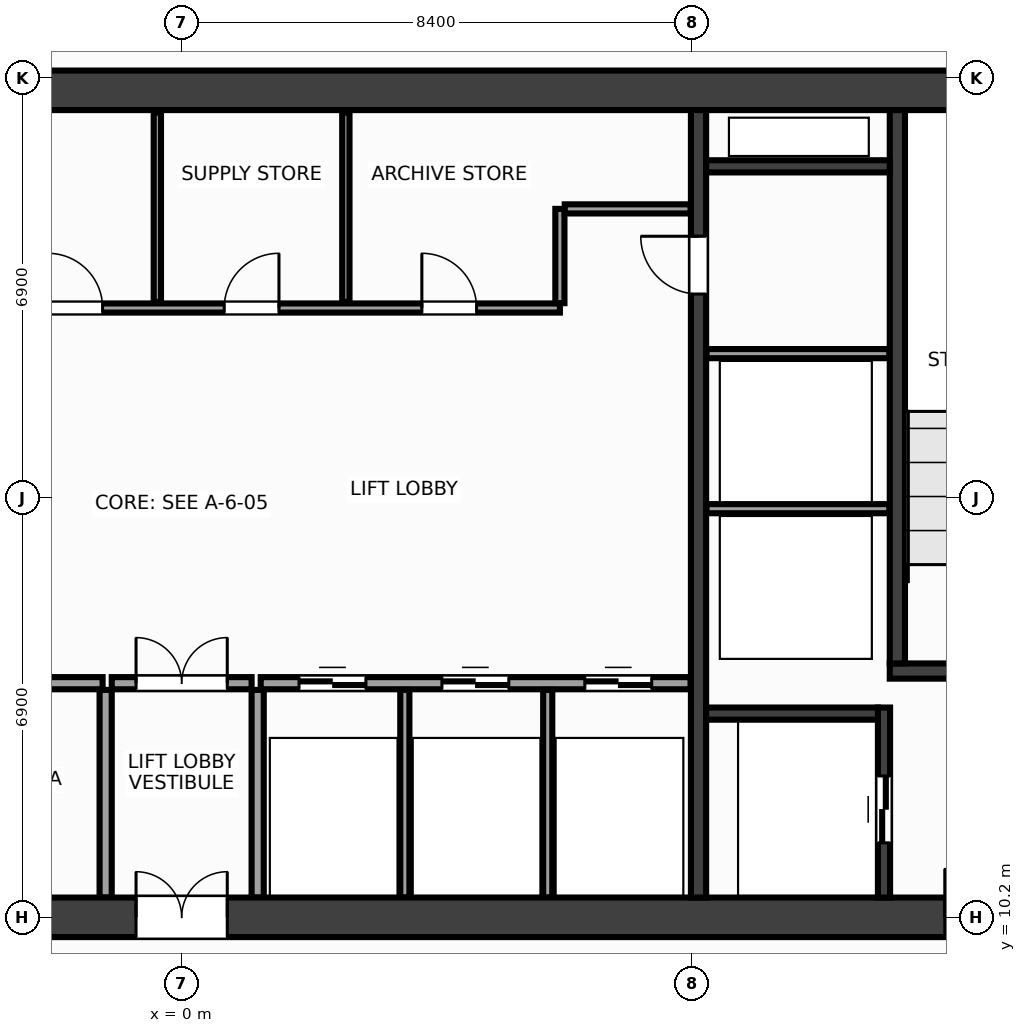
"""IFC4 building model, lengths in metres.
Left out: names, types, materials, properties, quantities, classifications, styles, units other than length and angle.
Written with IfcOpenShell. Run it as: python <this file> out.ifc"""

import sys

from ifc_helpers import new_model, si_unit, direction, frame, frame_2d, origin, place, context, subcontext, project, spatial, rectangle, extrude, source, transform, mapped, element, fill, save


model = new_model("IFC4")
c1 = context("Model", 3, precision=1e-05, world=origin(), true_north=direction((0.0, 1.0)))
c2 = subcontext(c1, "Body", "Model", "MODEL_VIEW")
j1 = project(units=[si_unit("LENGTHUNIT", "METRE"), si_unit("PLANEANGLEUNIT", "RADIAN")], contexts=[c1])
p1 = place(None, origin())
s1 = spatial("IfcSite", under=j1, at=p1, CompositionType="ELEMENT")
p2 = place(p1, origin())
s2 = spatial("IfcBuilding", under=s1, at=p2, CompositionType="ELEMENT")
p3 = place(p2, frame((0.0, 0.0, 178.4)))
s3 = spatial("IfcBuildingStorey", under=s2, at=p3, CompositionType="ELEMENT", Elevation=178.4)
m1 = source(origin(), c2, "Body", "SweptSolid", [
    extrude(rectangle(XDim=31.85, YDim=0.65, at=frame_2d((15.925, 0.0))), origin(), (0.0, 0.0, 1.0), 3.6),
])
p4 = place(p3, frame((-15.925, 23.8, 0.0), z_axis=(0.0, 0.0, 1.0), x_axis=(1.0, 0.0, 0.0)))
e1 = element("IfcWall", 1, at=p4, inside=s3, PredefinedType="SHEAR", context=c2, shape_type="MappedRepresentation", body=[
    mapped(m1, transform((0.0, 0.0, 0.0), x_axis=(1.0, 0.0, 0.0), y_axis=(0.0, 1.0, 0.0), z_axis=(0.0, 0.0, 1.0), scale=1.0)),
])
p5 = place(p3, frame((-15.925, 10.2, 0.0), z_axis=(0.0, 0.0, 1.0), x_axis=(1.0, 0.0, 0.0)))
e2 = element("IfcWall", 2, at=p5, inside=s3, PredefinedType="SHEAR", context=c2, shape_type="MappedRepresentation", body=[
    mapped(m1, transform((0.0, 0.0, 0.0), x_axis=(1.0, 0.0, 0.0), y_axis=(0.0, 1.0, 0.0), z_axis=(0.0, 0.0, 1.0), scale=1.0)),
])
p6 = place(p5, frame((1.775, 0.0, 0.0)))
e3 = element("IfcOpeningElement", 3, at=p6, cuts=e2, PredefinedType="OPENING", context=c2, shape_type="SweptSolid", body=[
    extrude(rectangle(XDim=1.6, YDim=2.15, at=frame_2d((0.8, 1.075))), frame((0.0, 0.337, 0.0), z_axis=(0.0, -1.0, 0.0), x_axis=(1.0, 0.0, 0.0)), (0.0, 0.0, 1.0), 0.674),
])
p7 = place(p5, frame((28.475, 0.0, 0.0)))
e4 = element("IfcOpeningElement", 4, at=p7, cuts=e2, PredefinedType="OPENING", context=c2, shape_type="SweptSolid", body=[
    extrude(rectangle(XDim=1.6, YDim=2.15, at=frame_2d((0.8, 1.075))), frame((0.0, 0.337, 0.0), z_axis=(0.0, -1.0, 0.0), x_axis=(1.0, 0.0, 0.0)), (0.0, 0.0, 1.0), 0.674),
])
p8 = place(p5, frame((15.175, 0.0, 0.0)))
e5 = element("IfcOpeningElement", 5, at=p8, cuts=e2, PredefinedType="OPENING", context=c2, shape_type="SweptSolid", body=[
    extrude(rectangle(XDim=1.5, YDim=2.2, at=frame_2d((0.75, 1.1))), frame((0.0, 0.337, 0.0), z_axis=(0.0, -1.0, 0.0), x_axis=(1.0, 0.0, 0.0)), (0.0, 0.0, 1.0), 0.674),
])
m2 = source(origin(), c2, "Body", "SweptSolid", [
    extrude(rectangle(XDim=12.95, YDim=0.25, at=frame_2d((6.475, 0.0))), origin(), (0.0, 0.0, 1.0), 3.6),
])
p9 = place(p3, frame((8.5, 10.525, 0.0), z_axis=(0.0, 0.0, 1.0), x_axis=(0.0, 1.0, 0.0)))
e6 = element("IfcWall", 6, at=p9, inside=s3, PredefinedType="SHEAR", context=c2, shape_type="MappedRepresentation", body=[
    mapped(m2, transform((0.0, 0.0, 0.0), x_axis=(1.0, 0.0, 0.0), y_axis=(0.0, 1.0, 0.0), z_axis=(0.0, 0.0, 1.0), scale=1.0)),
])
p10 = place(p9, frame((9.925, 0.0, 0.0)))
e7 = element("IfcOpeningElement", 7, at=p10, cuts=e6, PredefinedType="OPENING", context=c2, shape_type="SweptSolid", body=[
    extrude(rectangle(XDim=0.95, YDim=2.15, at=frame_2d((0.475, 1.075))), frame((0.0, 0.137, 0.0), z_axis=(0.0, -1.0, 0.0), x_axis=(1.0, 0.0, 0.0)), (0.0, 0.0, 1.0), 0.274),
])
m3 = source(origin(), c2, "Body", "SweptSolid", [
    extrude(rectangle(XDim=3.63, YDim=0.25, at=frame_2d((1.815, 0.0))), origin(), (0.0, 0.0, 1.0), 3.6),
])
p11 = place(p3, frame((11.645, 14.25, 0.0), z_axis=(0.0, 0.0, 1.0), x_axis=(1.0, 0.0, 0.0)))
e8 = element("IfcWall", 8, at=p11, inside=s3, PredefinedType="SHEAR", context=c2, shape_type="MappedRepresentation", body=[
    mapped(m3, transform((0.0, 0.0, 0.0), x_axis=(1.0, 0.0, 0.0), y_axis=(0.0, 1.0, 0.0), z_axis=(0.0, 0.0, 1.0), scale=1.0)),
])
p12 = place(p11, frame((0.95, 0.0, 0.0)))
e9 = element("IfcOpeningElement", 9, at=p12, cuts=e8, PredefinedType="OPENING", context=c2, shape_type="SweptSolid", body=[
    extrude(rectangle(XDim=1.6, YDim=2.15, at=frame_2d((0.8, 1.075))), frame((0.0, 0.137, 0.0), z_axis=(0.0, -1.0, 0.0), x_axis=(1.0, 0.0, 0.0)), (0.0, 0.0, 1.0), 0.274),
])
m4 = source(origin(), c2, "Body", "SweptSolid", [
    extrude(rectangle(XDim=9.1, YDim=0.25, at=frame_2d((4.55, 0.0))), origin(), (0.0, 0.0, 1.0), 3.6),
])
p13 = place(p3, frame((11.77, 14.375, 0.0), z_axis=(0.0, 0.0, 1.0), x_axis=(0.0, 1.0, 0.0)))
e10 = element("IfcWall", 10, at=p13, inside=s3, PredefinedType="SHEAR", context=c2, shape_type="MappedRepresentation", body=[
    mapped(m4, transform((0.0, 0.0, 0.0), x_axis=(1.0, 0.0, 0.0), y_axis=(0.0, 1.0, 0.0), z_axis=(0.0, 0.0, 1.0), scale=1.0)),
])
m5 = source(origin(), c2, "Body", "SweptSolid", [
    extrude(rectangle(XDim=3.125, YDim=0.2, at=frame_2d((1.562, 0.0))), origin(), (0.0, 0.0, 1.0), 3.6),
])
p14 = place(p3, frame((11.55, 10.525, 0.0), z_axis=(0.0, 0.0, 1.0), x_axis=(0.0, 1.0, 0.0)))
e11 = element("IfcWall", 11, at=p14, inside=s3, PredefinedType="SHEAR", context=c2, shape_type="MappedRepresentation", body=[
    mapped(m5, transform((0.0, 0.0, 0.0), x_axis=(1.0, 0.0, 0.0), y_axis=(0.0, 1.0, 0.0), z_axis=(0.0, 0.0, 1.0), scale=1.0)),
])
p15 = place(p14, frame((0.9, 0.0, 0.0)))
e12 = element("IfcOpeningElement", 12, at=p15, cuts=e11, PredefinedType="OPENING", context=c2, shape_type="SweptSolid", body=[
    extrude(rectangle(XDim=1.1, YDim=2.15, at=frame_2d((0.55, 1.075))), frame((0.0, 0.112, 0.0), z_axis=(0.0, -1.0, 0.0), x_axis=(1.0, 0.0, 0.0)), (0.0, 0.0, 1.0), 0.224),
])
m6 = source(origin(), c2, "Body", "SweptSolid", [
    extrude(rectangle(XDim=2.825, YDim=0.2, at=frame_2d((1.413, 0.0))), origin(), (0.0, 0.0, 1.0), 3.6),
])
p16 = place(p3, frame((8.625, 13.55, 0.0), z_axis=(0.0, 0.0, 1.0), x_axis=(1.0, 0.0, 0.0)))
e13 = element("IfcWall", 13, at=p16, inside=s3, PredefinedType="SHEAR", context=c2, shape_type="MappedRepresentation", body=[
    mapped(m6, transform((0.0, 0.0, 0.0), x_axis=(1.0, 0.0, 0.0), y_axis=(0.0, 1.0, 0.0), z_axis=(0.0, 0.0, 1.0), scale=1.0)),
])
m7 = source(origin(), c2, "Body", "SweptSolid", [
    extrude(rectangle(XDim=3.02, YDim=0.2, at=frame_2d((1.51, 0.0))), origin(), (0.0, 0.0, 1.0), 3.6),
])
p17 = place(p3, frame((8.625, 22.55, 0.0), z_axis=(0.0, 0.0, 1.0), x_axis=(1.0, 0.0, 0.0)))
e14 = element("IfcWall", 14, at=p17, inside=s3, PredefinedType="SHEAR", context=c2, shape_type="MappedRepresentation", body=[
    mapped(m7, transform((0.0, 0.0, 0.0), x_axis=(1.0, 0.0, 0.0), y_axis=(0.0, 1.0, 0.0), z_axis=(0.0, 0.0, 1.0), scale=1.0)),
])
m8 = source(origin(), c2, "Body", "SweptSolid", [
    extrude(rectangle(XDim=3.01, YDim=0.15, at=frame_2d((1.505, 0.0))), origin(), (0.0, 0.0, 1.0), 3.38),
])
for number, where, z_axis, x_axis in (
    (15, (8.63, 16.92, 0.0), (0.0, 0.0, 1.0), (1.0, 0.0, 0.0)),
    (16, (8.63, 19.47, 0.0), (0.0, 0.0, 1.0), (1.0, 0.0, 0.0)),
):
    element("IfcWall", number, at=place(p3, frame(where, z_axis=z_axis, x_axis=x_axis)), inside=s3, PredefinedType="PARTITIONING", context=c2, shape_type="MappedRepresentation", body=[
        mapped(m8, transform((0.0, 0.0, 0.0), x_axis=(1.0, 0.0, 0.0), y_axis=(0.0, 1.0, 0.0), z_axis=(0.0, 0.0, 1.0), scale=1.0)),
    ])
m9 = source(origin(), c2, "Body", "SweptSolid", [
    extrude(rectangle(XDim=7.07, YDim=0.2, at=frame_2d((3.535, 0.0))), origin(), (0.0, 0.0, 1.0), 3.38),
])
p18 = place(p3, frame((-8.37, 14.05, 0.0), z_axis=(0.0, 0.0, 1.0), x_axis=(1.0, 0.0, 0.0)))
e17 = element("IfcWall", 17, at=p18, inside=s3, PredefinedType="PARTITIONING", context=c2, shape_type="MappedRepresentation", body=[
    mapped(m9, transform((0.0, 0.0, 0.0), x_axis=(1.0, 0.0, 0.0), y_axis=(0.0, 1.0, 0.0), z_axis=(0.0, 0.0, 1.0), scale=1.0)),
])
p19 = place(p18, frame((1.06, 0.0, 0.0)))
e18 = element("IfcOpeningElement", 18, at=p19, cuts=e17, PredefinedType="OPENING", context=c2, shape_type="SweptSolid", body=[
    extrude(rectangle(XDim=0.9, YDim=2.15, at=frame_2d((0.45, 1.075))), frame((0.0, 0.112, 0.0), z_axis=(0.0, -1.0, 0.0), x_axis=(1.0, 0.0, 0.0)), (0.0, 0.0, 1.0), 0.224),
])
p20 = place(p18, frame((4.51, 0.0, 0.0)))
e19 = element("IfcOpeningElement", 19, at=p20, cuts=e17, PredefinedType="OPENING", context=c2, shape_type="SweptSolid", body=[
    extrude(rectangle(XDim=0.9, YDim=2.15, at=frame_2d((0.45, 1.075))), frame((0.0, 0.112, 0.0), z_axis=(0.0, -1.0, 0.0), x_axis=(1.0, 0.0, 0.0)), (0.0, 0.0, 1.0), 0.224),
])
p21 = place(p3, frame((1.3, 14.05, 0.0), z_axis=(0.0, 0.0, 1.0), x_axis=(1.0, 0.0, 0.0)))
e20 = element("IfcWall", 20, at=p21, inside=s3, PredefinedType="PARTITIONING", context=c2, shape_type="MappedRepresentation", body=[
    mapped(m9, transform((0.0, 0.0, 0.0), x_axis=(1.0, 0.0, 0.0), y_axis=(0.0, 1.0, 0.0), z_axis=(0.0, 0.0, 1.0), scale=1.0)),
])
p22 = place(p21, frame((0.63, 0.0, 0.0)))
e21 = element("IfcOpeningElement", 21, at=p22, cuts=e20, PredefinedType="OPENING", context=c2, shape_type="SweptSolid", body=[
    extrude(rectangle(XDim=1.1, YDim=2.15, at=frame_2d((0.55, 1.075))), frame((0.0, 0.112, 0.0), z_axis=(0.0, -1.0, 0.0), x_axis=(1.0, 0.0, 0.0)), (0.0, 0.0, 1.0), 0.224),
])
p23 = place(p21, frame((2.98, 0.0, 0.0)))
e22 = element("IfcOpeningElement", 22, at=p23, cuts=e20, PredefinedType="OPENING", context=c2, shape_type="SweptSolid", body=[
    extrude(rectangle(XDim=1.1, YDim=2.15, at=frame_2d((0.55, 1.075))), frame((0.0, 0.112, 0.0), z_axis=(0.0, -1.0, 0.0), x_axis=(1.0, 0.0, 0.0)), (0.0, 0.0, 1.0), 0.224),
])
p24 = place(p21, frame((5.33, 0.0, 0.0)))
e23 = element("IfcOpeningElement", 23, at=p24, cuts=e20, PredefinedType="OPENING", context=c2, shape_type="SweptSolid", body=[
    extrude(rectangle(XDim=1.1, YDim=2.15, at=frame_2d((0.55, 1.075))), frame((0.0, 0.112, 0.0), z_axis=(0.0, -1.0, 0.0), x_axis=(1.0, 0.0, 0.0)), (0.0, 0.0, 1.0), 0.224),
])
m10 = source(origin(), c2, "Body", "SweptSolid", [
    extrude(rectangle(XDim=3.415, YDim=0.2, at=frame_2d((1.708, 0.0))), origin(), (0.0, 0.0, 1.0), 3.38),
])
for number, where, z_axis, x_axis in (
    (24, (-1.25, 10.525, 0.0), (0.0, 0.0, 1.0), (0.0, 1.0, 0.0)),
    (25, (1.25, 10.525, 0.0), (0.0, 0.0, 1.0), (0.0, 1.0, 0.0)),
):
    element("IfcWall", number, at=place(p3, frame(where, z_axis=z_axis, x_axis=x_axis)), inside=s3, PredefinedType="PARTITIONING", context=c2, shape_type="MappedRepresentation", body=[
        mapped(m10, transform((0.0, 0.0, 0.0), x_axis=(1.0, 0.0, 0.0), y_axis=(0.0, 1.0, 0.0), z_axis=(0.0, 0.0, 1.0), scale=1.0)),
    ])
m11 = source(origin(), c2, "Body", "SweptSolid", [
    extrude(rectangle(XDim=2.3, YDim=0.2, at=frame_2d((1.15, 0.0))), origin(), (0.0, 0.0, 1.0), 3.38),
])
p25 = place(p3, frame((-1.15, 14.05, 0.0), z_axis=(0.0, 0.0, 1.0), x_axis=(1.0, 0.0, 0.0)))
e26 = element("IfcWall", 26, at=p25, inside=s3, PredefinedType="PARTITIONING", context=c2, shape_type="MappedRepresentation", body=[
    mapped(m11, transform((0.0, 0.0, 0.0), x_axis=(1.0, 0.0, 0.0), y_axis=(0.0, 1.0, 0.0), z_axis=(0.0, 0.0, 1.0), scale=1.0)),
])
p26 = place(p25, frame((0.4, 0.0, 0.0)))
e27 = element("IfcOpeningElement", 27, at=p26, cuts=e26, PredefinedType="OPENING", context=c2, shape_type="SweptSolid", body=[
    extrude(rectangle(XDim=1.5, YDim=2.2, at=frame_2d((0.75, 1.1))), frame((0.0, 0.112, 0.0), z_axis=(0.0, -1.0, 0.0), x_axis=(1.0, 0.0, 0.0)), (0.0, 0.0, 1.0), 0.224),
])
m12 = source(origin(), c2, "Body", "SweptSolid", [
    extrude(rectangle(XDim=14.59, YDim=0.15, at=frame_2d((7.295, 0.0))), origin(), (0.0, 0.0, 1.0), 3.38),
])
p27 = place(p3, frame((-8.37, 20.22, 0.0), z_axis=(0.0, 0.0, 1.0), x_axis=(1.0, 0.0, 0.0)))
e28 = element("IfcWall", 28, at=p27, inside=s3, PredefinedType="PARTITIONING", context=c2, shape_type="MappedRepresentation", body=[
    mapped(m12, transform((0.0, 0.0, 0.0), x_axis=(1.0, 0.0, 0.0), y_axis=(0.0, 1.0, 0.0), z_axis=(0.0, 0.0, 1.0), scale=1.0)),
])
p28 = place(p27, frame((0.86, 0.0, 0.0)))
e29 = element("IfcOpeningElement", 29, at=p28, cuts=e28, PredefinedType="OPENING", context=c2, shape_type="SweptSolid", body=[
    extrude(rectangle(XDim=0.9, YDim=2.15, at=frame_2d((0.45, 1.075))), frame((0.0, 0.087, 0.0), z_axis=(0.0, -1.0, 0.0), x_axis=(1.0, 0.0, 0.0)), (0.0, 0.0, 1.0), 0.174),
])
p29 = place(p27, frame((3.47, 0.0, 0.0)))
e30 = element("IfcOpeningElement", 30, at=p29, cuts=e28, PredefinedType="OPENING", context=c2, shape_type="SweptSolid", body=[
    extrude(rectangle(XDim=0.9, YDim=2.15, at=frame_2d((0.45, 1.075))), frame((0.0, 0.087, 0.0), z_axis=(0.0, -1.0, 0.0), x_axis=(1.0, 0.0, 0.0)), (0.0, 0.0, 1.0), 0.174),
])
p30 = place(p27, frame((6.17, 0.0, 0.0)))
e31 = element("IfcOpeningElement", 31, at=p30, cuts=e28, PredefinedType="OPENING", context=c2, shape_type="SweptSolid", body=[
    extrude(rectangle(XDim=0.9, YDim=2.15, at=frame_2d((0.45, 1.075))), frame((0.0, 0.087, 0.0), z_axis=(0.0, -1.0, 0.0), x_axis=(1.0, 0.0, 0.0)), (0.0, 0.0, 1.0), 0.174),
])
p31 = place(p27, frame((9.07, 0.0, 0.0)))
e32 = element("IfcOpeningElement", 32, at=p31, cuts=e28, PredefinedType="OPENING", context=c2, shape_type="SweptSolid", body=[
    extrude(rectangle(XDim=0.9, YDim=2.15, at=frame_2d((0.45, 1.075))), frame((0.0, 0.087, 0.0), z_axis=(0.0, -1.0, 0.0), x_axis=(1.0, 0.0, 0.0)), (0.0, 0.0, 1.0), 0.174),
])
p32 = place(p27, frame((12.32, 0.0, 0.0)))
e33 = element("IfcOpeningElement", 33, at=p32, cuts=e28, PredefinedType="OPENING", context=c2, shape_type="SweptSolid", body=[
    extrude(rectangle(XDim=0.9, YDim=2.15, at=frame_2d((0.45, 1.075))), frame((0.0, 0.087, 0.0), z_axis=(0.0, -1.0, 0.0), x_axis=(1.0, 0.0, 0.0)), (0.0, 0.0, 1.0), 0.174),
])
m13 = source(origin(), c2, "Body", "SweptSolid", [
    extrude(rectangle(XDim=1.55, YDim=0.15, at=frame_2d((0.775, 0.0))), origin(), (0.0, 0.0, 1.0), 3.38),
])
p33 = place(p3, frame((6.22, 20.3, 0.0), z_axis=(0.0, 0.0, 1.0), x_axis=(0.0, 1.0, 0.0)))
e34 = element("IfcWall", 34, at=p33, inside=s3, PredefinedType="PARTITIONING", context=c2, shape_type="MappedRepresentation", body=[
    mapped(m13, transform((0.0, 0.0, 0.0), x_axis=(1.0, 0.0, 0.0), y_axis=(0.0, 1.0, 0.0), z_axis=(0.0, 0.0, 1.0), scale=1.0)),
])
m14 = source(origin(), c2, "Body", "SweptSolid", [
    extrude(rectangle(XDim=2.07, YDim=0.15, at=frame_2d((1.035, 0.0))), origin(), (0.0, 0.0, 1.0), 3.38),
])
p34 = place(p3, frame((6.3, 21.85, 0.0), z_axis=(0.0, 0.0, 1.0), x_axis=(1.0, 0.0, 0.0)))
e35 = element("IfcWall", 35, at=p34, inside=s3, PredefinedType="PARTITIONING", context=c2, shape_type="MappedRepresentation", body=[
    mapped(m14, transform((0.0, 0.0, 0.0), x_axis=(1.0, 0.0, 0.0), y_axis=(0.0, 1.0, 0.0), z_axis=(0.0, 0.0, 1.0), scale=1.0)),
])
m15 = source(origin(), c2, "Body", "SweptSolid", [
    extrude(rectangle(XDim=3.415, YDim=0.15, at=frame_2d((1.708, 0.0))), origin(), (0.0, 0.0, 1.0), 3.38),
])
for number, where, z_axis, x_axis in (
    (36, (3.67, 10.525, 0.0), (0.0, 0.0, 1.0), (0.0, 1.0, 0.0)),
    (37, (6.02, 10.525, 0.0), (0.0, 0.0, 1.0), (0.0, 1.0, 0.0)),
):
    element("IfcWall", number, at=place(p3, frame(where, z_axis=z_axis, x_axis=x_axis)), inside=s3, PredefinedType="PARTITIONING", context=c2, shape_type="MappedRepresentation", body=[
        mapped(m15, transform((0.0, 0.0, 0.0), x_axis=(1.0, 0.0, 0.0), y_axis=(0.0, 1.0, 0.0), z_axis=(0.0, 0.0, 1.0), scale=1.0)),
    ])
m16 = source(origin(), c2, "Body", "SweptSolid", [
    extrude(rectangle(XDim=3.115, YDim=0.12, at=frame_2d((1.558, 0.0))), origin(), (0.0, 0.0, 1.0), 3.38),
])
for number, where, z_axis, x_axis in (
    (38, (-0.4, 20.32, 0.0), (0.0, 0.0, 1.0), (0.0, 1.0, 0.0)),
    (39, (2.7, 20.32, 0.0), (0.0, 0.0, 1.0), (0.0, 1.0, 0.0)),
):
    element("IfcWall", number, at=place(p3, frame(where, z_axis=z_axis, x_axis=x_axis)), inside=s3, PredefinedType="PARTITIONING", context=c2, shape_type="MappedRepresentation", body=[
        mapped(m16, transform((0.0, 0.0, 0.0), x_axis=(1.0, 0.0, 0.0), y_axis=(0.0, 1.0, 0.0), z_axis=(0.0, 0.0, 1.0), scale=1.0)),
    ])
m17 = source(origin(), c2, "Body", "SweptSolid", [
    extrude(rectangle(XDim=1.6, YDim=2.15, at=frame_2d((0.8, 1.075))), frame((0.0, 0.025, 0.0), z_axis=(0.0, -1.0, 0.0), x_axis=(1.0, 0.0, 0.0)), (0.0, 0.0, 1.0), 0.05),
])
p35 = place(p7, origin())
e40 = element("IfcDoor", 40, at=p35, inside=s3, OperationType="DOUBLE_DOOR_SINGLE_SWING", PredefinedType="DOOR", context=c2, shape_type="MappedRepresentation", body=[
    mapped(m17, transform((0.0, 0.0, 0.0), x_axis=(1.0, 0.0, 0.0), y_axis=(0.0, 1.0, 0.0), z_axis=(0.0, 0.0, 1.0), scale=1.0)),
])
fill(e4, e40)
m18 = source(origin(), c2, "Body", "SweptSolid", [
    extrude(rectangle(XDim=1.1, YDim=2.15, at=frame_2d((0.55, 1.075))), frame((0.0, 0.025, 0.0), z_axis=(0.0, -1.0, 0.0), x_axis=(1.0, 0.0, 0.0)), (0.0, 0.0, 1.0), 0.05),
])
p36 = place(p15, origin())
e41 = element("IfcDoor", 41, at=p36, inside=s3, OperationType="DOUBLE_DOOR_SLIDING", PredefinedType="DOOR", context=c2, shape_type="MappedRepresentation", body=[
    mapped(m18, transform((0.0, 0.0, 0.0), x_axis=(1.0, 0.0, 0.0), y_axis=(0.0, 1.0, 0.0), z_axis=(0.0, 0.0, 1.0), scale=1.0)),
])
fill(e12, e41)
m19 = source(origin(), c2, "Body", "SweptSolid", [
    extrude(rectangle(XDim=0.95, YDim=2.15, at=frame_2d((0.475, 1.075))), frame((0.0, 0.025, 0.0), z_axis=(0.0, -1.0, 0.0), x_axis=(1.0, 0.0, 0.0)), (0.0, 0.0, 1.0), 0.05),
])
p37 = place(p10, origin())
e42 = element("IfcDoor", 42, at=p37, inside=s3, OperationType="SINGLE_SWING_RIGHT", PredefinedType="DOOR", context=c2, shape_type="MappedRepresentation", body=[
    mapped(m19, transform((0.0, 0.0, 0.0), x_axis=(1.0, 0.0, 0.0), y_axis=(0.0, 1.0, 0.0), z_axis=(0.0, 0.0, 1.0), scale=1.0)),
])
fill(e7, e42)
p38 = place(p22, origin())
e43 = element("IfcDoor", 43, at=p38, inside=s3, OperationType="DOUBLE_DOOR_SLIDING", PredefinedType="DOOR", context=c2, shape_type="MappedRepresentation", body=[
    mapped(m18, transform((0.0, 0.0, 0.0), x_axis=(1.0, 0.0, 0.0), y_axis=(0.0, 1.0, 0.0), z_axis=(0.0, 0.0, 1.0), scale=1.0)),
])
fill(e21, e43)
p39 = place(p23, origin())
e44 = element("IfcDoor", 44, at=p39, inside=s3, OperationType="DOUBLE_DOOR_SLIDING", PredefinedType="DOOR", context=c2, shape_type="MappedRepresentation", body=[
    mapped(m18, transform((0.0, 0.0, 0.0), x_axis=(1.0, 0.0, 0.0), y_axis=(0.0, 1.0, 0.0), z_axis=(0.0, 0.0, 1.0), scale=1.0)),
])
fill(e22, e44)
p40 = place(p24, origin())
e45 = element("IfcDoor", 45, at=p40, inside=s3, OperationType="DOUBLE_DOOR_SLIDING", PredefinedType="DOOR", context=c2, shape_type="MappedRepresentation", body=[
    mapped(m18, transform((0.0, 0.0, 0.0), x_axis=(1.0, 0.0, 0.0), y_axis=(0.0, 1.0, 0.0), z_axis=(0.0, 0.0, 1.0), scale=1.0)),
])
fill(e23, e45)
m20 = source(origin(), c2, "Body", "SweptSolid", [
    extrude(rectangle(XDim=1.5, YDim=2.2, at=frame_2d((0.75, 1.1))), frame((0.0, 0.025, 0.0), z_axis=(0.0, -1.0, 0.0), x_axis=(1.0, 0.0, 0.0)), (0.0, 0.0, 1.0), 0.05),
])
p41 = place(p26, origin())
e46 = element("IfcDoor", 46, at=p41, inside=s3, OperationType="DOUBLE_DOOR_SINGLE_SWING", PredefinedType="DOOR", context=c2, shape_type="MappedRepresentation", body=[
    mapped(m20, transform((0.0, 0.0, 0.0), x_axis=(1.0, 0.0, 0.0), y_axis=(0.0, 1.0, 0.0), z_axis=(0.0, 0.0, 1.0), scale=1.0)),
])
fill(e27, e46)
p42 = place(p8, origin())
e47 = element("IfcDoor", 47, at=p42, inside=s3, OperationType="DOUBLE_DOOR_SINGLE_SWING", PredefinedType="DOOR", context=c2, shape_type="MappedRepresentation", body=[
    mapped(m20, transform((0.0, 0.0, 0.0), x_axis=(1.0, 0.0, 0.0), y_axis=(0.0, 1.0, 0.0), z_axis=(0.0, 0.0, 1.0), scale=1.0)),
])
fill(e5, e47)
m21 = source(origin(), c2, "Body", "SweptSolid", [
    extrude(rectangle(XDim=0.9, YDim=2.15, at=frame_2d((0.45, 1.075))), frame((0.0, 0.025, 0.0), z_axis=(0.0, -1.0, 0.0), x_axis=(1.0, 0.0, 0.0)), (0.0, 0.0, 1.0), 0.05),
])
p43 = place(p30, origin())
e48 = element("IfcDoor", 48, at=p43, inside=s3, OperationType="SINGLE_SWING_LEFT", PredefinedType="DOOR", context=c2, shape_type="MappedRepresentation", body=[
    mapped(m21, transform((0.0, 0.0, 0.0), x_axis=(1.0, 0.0, 0.0), y_axis=(0.0, 1.0, 0.0), z_axis=(0.0, 0.0, 1.0), scale=1.0)),
])
fill(e31, e48)
p44 = place(p31, origin())
e49 = element("IfcDoor", 49, at=p44, inside=s3, OperationType="SINGLE_SWING_RIGHT", PredefinedType="DOOR", context=c2, shape_type="MappedRepresentation", body=[
    mapped(m21, transform((0.0, 0.0, 0.0), x_axis=(1.0, 0.0, 0.0), y_axis=(0.0, 1.0, 0.0), z_axis=(0.0, 0.0, 1.0), scale=1.0)),
])
fill(e32, e49)
p45 = place(p32, origin())
e50 = element("IfcDoor", 50, at=p45, inside=s3, OperationType="SINGLE_SWING_LEFT", PredefinedType="DOOR", context=c2, shape_type="MappedRepresentation", body=[
    mapped(m21, transform((0.0, 0.0, 0.0), x_axis=(1.0, 0.0, 0.0), y_axis=(0.0, 1.0, 0.0), z_axis=(0.0, 0.0, 1.0), scale=1.0)),
])
fill(e33, e50)
save(model, sys.argv[1])
